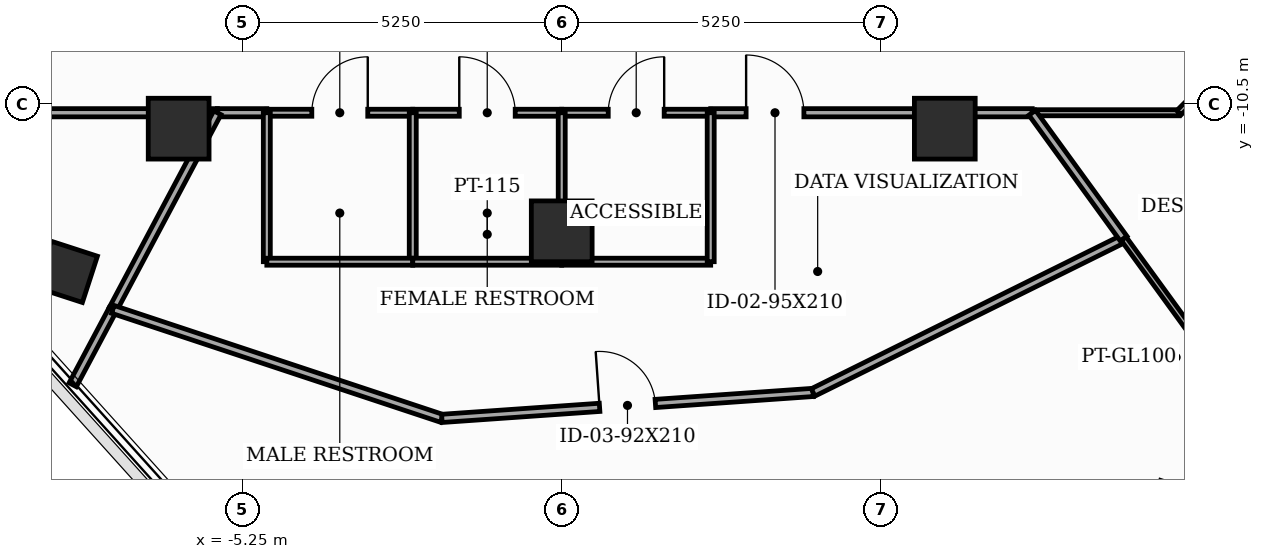
"""IFC4 building model, lengths in metres.
Left out: names, types, materials, properties, quantities, classifications, styles, units other than length and angle.
Written with IfcOpenShell. Run it as: python <this file> out.ifc"""

import sys

from ifc_helpers import new_model, si_unit, direction, frame, frame_2d, origin, origin_2d, place, context, subcontext, project, spatial, rectangle, extrude, element, fill, save


model = new_model("IFC4")
c1 = context("Model", 3, precision=1e-05, world=origin(), true_north=direction((0.0, 1.0)))
c2 = subcontext(c1, "Body", "Model", "MODEL_VIEW")
j1 = project(units=[si_unit("LENGTHUNIT", "METRE"), si_unit("PLANEANGLEUNIT", "RADIAN")], contexts=[c1])
p1 = place(None, origin())
s1 = spatial("IfcSite", under=j1, at=p1, CompositionType="ELEMENT")
p2 = place(p1, origin())
s2 = spatial("IfcBuilding", under=s1, at=p2, CompositionType="ELEMENT")
p3 = place(p2, frame((0.0, 0.0, 298.0)))
s3 = spatial("IfcBuildingStorey", under=s2, at=p3, CompositionType="ELEMENT", Elevation=298.0)
for number, where, z_axis, x_axis in (
    (1, (-6.3, -10.912, 0.0), (0.0, 0.0, 1.0), (1.0, 0.0, 0.0)),
    (2, (0.0, -12.6, 0.0), (0.0, 0.0, 1.0), (1.0, 0.0, 0.0)),
    (3, (6.3, -10.912, 0.0), (0.0, 0.0, 1.0), (1.0, 0.0, 0.0)),
):
    element("IfcColumn", number, at=place(p3, frame(where, z_axis=z_axis, x_axis=x_axis)), inside=s3, PredefinedType="COLUMN", context=c2, shape_type="SweptSolid", body=[
        extrude(rectangle(XDim=1.0, YDim=1.0, at=origin_2d()), origin(), (0.0, 0.0, 1.0), 3.7),
    ])
p4 = place(p3, frame((-8.14, -13.266, 0.0), z_axis=(0.0, 0.0, 1.0), x_axis=(0.309016994375, 0.951056516295, 0.0)))
e4 = element("IfcColumn", 4, at=p4, inside=s3, PredefinedType="COLUMN", context=c2, shape_type="SweptSolid", body=[
    extrude(rectangle(XDim=0.8, YDim=0.8, at=origin_2d()), origin(), (0.0, 0.0, 1.0), 3.7),
])
p5 = place(p3, frame((-10.15, -10.65, 0.0), z_axis=(0.0, 0.0, 1.0), x_axis=(1.0, 0.0, 0.0)))
e5 = element("IfcWall", 5, at=p5, inside=s3, PredefinedType="PARTITIONING", context=c2, shape_type="SweptSolid", body=[
    extrude(rectangle(XDim=4.487, YDim=0.135, at=frame_2d((2.243, 0.0))), origin(), (0.0, 0.0, 1.0), 2.885),
])
p6 = place(p3, frame((-4.85, -10.65, 0.0), z_axis=(0.0, 0.0, 1.0), x_axis=(1.0, 0.0, 0.0)))
e6 = element("IfcWall", 6, at=p6, inside=s3, PredefinedType="PARTITIONING", context=c2, shape_type="SweptSolid", body=[
    extrude(rectangle(XDim=2.4, YDim=0.115, at=frame_2d((1.2, 0.0))), origin(), (0.0, 0.0, 1.0), 3.5),
])
p7 = place(p6, frame((0.74, 0.0, 0.0)))
e7 = element("IfcOpeningElement", 7, at=p7, cuts=e6, PredefinedType="OPENING", context=c2, shape_type="SweptSolid", body=[
    extrude(rectangle(XDim=0.92, YDim=2.1, at=frame_2d((0.46, 1.05))), frame((0.0, 0.067, 0.0), z_axis=(0.0, -1.0, 0.0), x_axis=(1.0, 0.0, 0.0)), (0.0, 0.0, 1.0), 0.135),
])
p8 = place(p3, frame((-2.45, -10.65, 0.0), z_axis=(0.0, 0.0, 1.0), x_axis=(1.0, 0.0, 0.0)))
e8 = element("IfcWall", 8, at=p8, inside=s3, PredefinedType="PARTITIONING", context=c2, shape_type="SweptSolid", body=[
    extrude(rectangle(XDim=2.45, YDim=0.115, at=frame_2d((1.225, 0.0))), origin(), (0.0, 0.0, 1.0), 2.885),
])
p9 = place(p8, frame((0.765, 0.0, 0.0)))
e9 = element("IfcOpeningElement", 9, at=p9, cuts=e8, PredefinedType="OPENING", context=c2, shape_type="SweptSolid", body=[
    extrude(rectangle(XDim=0.92, YDim=2.1, at=frame_2d((0.46, 1.05))), frame((0.0, 0.067, 0.0), z_axis=(0.0, -1.0, 0.0), x_axis=(1.0, 0.0, 0.0)), (0.0, 0.0, 1.0), 0.135),
])
p10 = place(p3, frame((0.0, -10.65, 0.0), z_axis=(0.0, 0.0, 1.0), x_axis=(1.0, 0.0, 0.0)))
e10 = element("IfcWall", 10, at=p10, inside=s3, PredefinedType="PARTITIONING", context=c2, shape_type="SweptSolid", body=[
    extrude(rectangle(XDim=2.45, YDim=0.115, at=frame_2d((1.225, 0.0))), origin(), (0.0, 0.0, 1.0), 3.5),
])
p11 = place(p10, frame((0.765, 0.0, 0.0)))
e11 = element("IfcOpeningElement", 11, at=p11, cuts=e10, PredefinedType="OPENING", context=c2, shape_type="SweptSolid", body=[
    extrude(rectangle(XDim=0.92, YDim=2.1, at=frame_2d((0.46, 1.05))), frame((0.0, 0.067, 0.0), z_axis=(0.0, -1.0, 0.0), x_axis=(1.0, 0.0, 0.0)), (0.0, 0.0, 1.0), 0.135),
])
p12 = place(p3, frame((-5.663, -10.65, 0.0), z_axis=(0.0, 0.0, 1.0), x_axis=(1.0, 0.0, 0.0)))
e12 = element("IfcWall", 12, at=p12, inside=s3, PredefinedType="PARTITIONING", context=c2, shape_type="SweptSolid", body=[
    extrude(rectangle(XDim=0.813, YDim=0.135, at=frame_2d((0.406, 0.0))), origin(), (0.0, 0.0, 1.0), 3.5),
])
p13 = place(p3, frame((2.45, -10.65, 0.0), z_axis=(0.0, 0.0, 1.0), x_axis=(1.0, 0.0, 0.0)))
e13 = element("IfcWall", 13, at=p13, inside=s3, PredefinedType="PARTITIONING", context=c2, shape_type="SweptSolid", body=[
    extrude(rectangle(XDim=5.288, YDim=0.135, at=frame_2d((2.644, 0.0))), origin(), (0.0, 0.0, 1.0), 2.885),
])
p14 = place(p13, frame((0.583, 0.0, 0.0)))
e14 = element("IfcOpeningElement", 14, at=p14, cuts=e13, PredefinedType="OPENING", context=c2, shape_type="SweptSolid", body=[
    extrude(rectangle(XDim=0.95, YDim=2.1, at=frame_2d((0.475, 1.05))), frame((0.0, 0.077, 0.0), z_axis=(0.0, -1.0, 0.0), x_axis=(1.0, 0.0, 0.0)), (0.0, 0.0, 1.0), 0.155),
])
p15 = place(p3, frame((7.738, -10.65, 0.0), z_axis=(0.0, 0.0, 1.0), x_axis=(1.0, 0.0, 0.0)))
e15 = element("IfcWall", 15, at=p15, inside=s3, PredefinedType="MOVABLE", context=c2, shape_type="SweptSolid", body=[
    extrude(rectangle(XDim=2.412, YDim=0.1, at=frame_2d((1.206, 0.0))), origin(), (0.0, 0.0, 1.0), 3.5),
])
p16 = place(p3, frame((10.15, -10.65, 0.0), z_axis=(0.0, 0.0, 1.0), x_axis=(0.707106781187, 0.707106781187, 0.0)))
e16 = element("IfcWall", 16, at=p16, inside=s3, PredefinedType="MOVABLE", context=c2, shape_type="SweptSolid", body=[
    extrude(rectangle(XDim=0.707, YDim=0.1, at=frame_2d((0.354, 0.0))), origin(), (0.0, 0.0, 1.0), 3.5),
])
p17 = place(p3, frame((-7.382, -13.884, 0.0), z_axis=(0.0, 0.0, 1.0), x_axis=(0.469338791783, 0.88301817565, 0.0)))
e17 = element("IfcWall", 17, at=p17, inside=s3, PredefinedType="PARTITIONING", context=c2, shape_type="SweptSolid", body=[
    extrude(rectangle(XDim=3.663, YDim=0.135, at=frame_2d((1.831, 0.0))), origin(), (0.0, 0.0, 1.0), 2.885),
])
p18 = place(p3, frame((-8.042, -15.124, 0.0), z_axis=(0.0, 0.0, 1.0), x_axis=(0.469595679185, 0.882881587808, 0.0)))
e18 = element("IfcWall", 18, at=p18, inside=s3, PredefinedType="PARTITIONING", context=c2, shape_type="SweptSolid", body=[
    extrude(rectangle(XDim=1.405, YDim=0.135, at=frame_2d((0.702, 0.0))), origin(), (0.0, 0.0, 1.0), 3.035),
])
for number, where, z_axis, x_axis in (
    (19, (-2.45, -13.1, 0.0), (0.0, 0.0, 1.0), (0.0, 1.0, 0.0)),
    (20, (-4.85, -10.65, 0.0), (0.0, 0.0, 1.0), (0.0, -1.0, 0.0)),
):
    element("IfcWall", number, at=place(p3, frame(where, z_axis=z_axis, x_axis=x_axis)), inside=s3, PredefinedType="PARTITIONING", context=c2, shape_type="SweptSolid", body=[
        extrude(rectangle(XDim=2.45, YDim=0.115, at=frame_2d((1.225, 0.0))), origin(), (0.0, 0.0, 1.0), 2.885),
    ])
p19 = place(p3, frame((-4.85, -13.1, 0.0), z_axis=(0.0, 0.0, 1.0), x_axis=(1.0, 0.0, 0.0)))
e21 = element("IfcWall", 21, at=p19, inside=s3, PredefinedType="PARTITIONING", context=c2, shape_type="SweptSolid", body=[
    extrude(rectangle(XDim=2.4, YDim=0.115, at=frame_2d((1.2, 0.0))), origin(), (0.0, 0.0, 1.0), 3.5),
])
p20 = place(p3, frame((0.0, -13.1, 0.0), z_axis=(0.0, 0.0, 1.0), x_axis=(0.0, 1.0, 0.0)))
e22 = element("IfcWall", 22, at=p20, inside=s3, PredefinedType="PARTITIONING", context=c2, shape_type="SweptSolid", body=[
    extrude(rectangle(XDim=2.45, YDim=0.115, at=frame_2d((1.225, 0.0))), origin(), (0.0, 0.0, 1.0), 2.885),
])
for number, where, z_axis, x_axis in (
    (23, (-2.45, -13.1, 0.0), (0.0, 0.0, 1.0), (1.0, 0.0, 0.0)),
    (24, (0.0, -13.1, 0.0), (0.0, 0.0, 1.0), (1.0, 0.0, 0.0)),
):
    element("IfcWall", number, at=place(p3, frame(where, z_axis=z_axis, x_axis=x_axis)), inside=s3, PredefinedType="PARTITIONING", context=c2, shape_type="SweptSolid", body=[
        extrude(rectangle(XDim=2.45, YDim=0.115, at=frame_2d((1.225, 0.0))), origin(), (0.0, 0.0, 1.0), 3.035),
    ])
p21 = place(p3, frame((2.45, -13.1, 0.0), z_axis=(0.0, 0.0, 1.0), x_axis=(0.0, 1.0, 0.0)))
e25 = element("IfcWall", 25, at=p21, inside=s3, PredefinedType="PARTITIONING", context=c2, shape_type="SweptSolid", body=[
    extrude(rectangle(XDim=2.45, YDim=0.115, at=frame_2d((1.225, 0.0))), origin(), (0.0, 0.0, 1.0), 2.885),
])
p22 = place(p3, frame((-7.382, -13.884, 0.0), z_axis=(0.0, 0.0, 1.0), x_axis=(0.949247116003, -0.314531258795, 0.0)))
e26 = element("IfcWall", 26, at=p22, inside=s3, PredefinedType="PARTITIONING", context=c2, shape_type="SweptSolid", body=[
    extrude(rectangle(XDim=5.7, YDim=0.135, at=frame_2d((2.85, 0.0))), origin(), (0.0, 0.0, 1.0), 3.035),
])
p23 = place(p3, frame((-1.971, -15.677, 0.0), z_axis=(0.0, 0.0, 1.0), x_axis=(0.997562911572, 0.069772755832, 0.0)))
e27 = element("IfcWall", 27, at=p23, inside=s3, PredefinedType="PARTITIONING", context=c2, shape_type="SweptSolid", body=[
    extrude(rectangle(XDim=6.12, YDim=0.135, at=frame_2d((3.06, 0.0))), origin(), (0.0, 0.0, 1.0), 3.035),
])
p24 = place(p23, frame((2.6, 0.0, 0.0)))
e28 = element("IfcOpeningElement", 28, at=p24, cuts=e27, PredefinedType="OPENING", context=c2, shape_type="SweptSolid", body=[
    extrude(rectangle(XDim=0.92, YDim=2.1, at=frame_2d((0.46, 1.05))), frame((0.0, 0.077, 0.0), z_axis=(0.0, -1.0, 0.0), x_axis=(1.0, 0.0, 0.0)), (0.0, 0.0, 1.0), 0.155),
])
p25 = place(p3, frame((4.134, -15.25, 0.0), z_axis=(0.0, 0.0, 1.0), x_axis=(0.896167979159, 0.443714945804, 0.0)))
e29 = element("IfcWall", 29, at=p25, inside=s3, PredefinedType="PARTITIONING", context=c2, shape_type="SweptSolid", body=[
    extrude(rectangle(XDim=5.7, YDim=0.135, at=frame_2d((2.85, 0.0))), origin(), (0.0, 0.0, 1.0), 3.035),
])
p26 = place(p3, frame((9.242, -12.721, 0.0), z_axis=(0.0, 0.0, 1.0), x_axis=(-0.58758169089, 0.80916485127, 0.0)))
e30 = element("IfcWall", 30, at=p26, inside=s3, PredefinedType="PARTITIONING", context=c2, shape_type="SweptSolid", body=[
    extrude(rectangle(XDim=2.56, YDim=0.135, at=frame_2d((1.28, 0.0))), origin(), (0.0, 0.0, 1.0), 3.5),
])
p27 = place(p3, frame((11.695, -16.096, 0.0), z_axis=(0.0, 0.0, 1.0), x_axis=(-0.587938546927, 0.808905597111, 0.0)))
e31 = element("IfcWall", 31, at=p27, inside=s3, PredefinedType="MOVABLE", context=c2, shape_type="SweptSolid", body=[
    extrude(rectangle(XDim=4.172, YDim=0.1, at=frame_2d((2.086, 0.0))), origin(), (0.0, 0.0, 1.0), 3.035),
])
p28 = place(p7, origin())
e32 = element("IfcDoor", 32, at=p28, inside=s3, OperationType="SINGLE_SWING_RIGHT", PredefinedType="DOOR", context=c2, shape_type="SweptSolid", body=[
    extrude(rectangle(XDim=0.92, YDim=2.1, at=frame_2d((0.46, 1.05))), frame((0.0, 0.025, 0.0), z_axis=(0.0, -1.0, 0.0), x_axis=(1.0, 0.0, 0.0)), (0.0, 0.0, 1.0), 0.05),
])
fill(e7, e32)
p29 = place(p9, origin())
e33 = element("IfcDoor", 33, at=p29, inside=s3, OperationType="SINGLE_SWING_LEFT", PredefinedType="DOOR", context=c2, shape_type="SweptSolid", body=[
    extrude(rectangle(XDim=0.92, YDim=2.1, at=frame_2d((0.46, 1.05))), frame((0.0, 0.025, 0.0), z_axis=(0.0, -1.0, 0.0), x_axis=(1.0, 0.0, 0.0)), (0.0, 0.0, 1.0), 0.05),
])
fill(e9, e33)
p30 = place(p11, origin())
e34 = element("IfcDoor", 34, at=p30, inside=s3, OperationType="SINGLE_SWING_RIGHT", PredefinedType="DOOR", context=c2, shape_type="SweptSolid", body=[
    extrude(rectangle(XDim=0.92, YDim=2.1, at=frame_2d((0.46, 1.05))), frame((0.0, 0.025, 0.0), z_axis=(0.0, -1.0, 0.0), x_axis=(1.0, 0.0, 0.0)), (0.0, 0.0, 1.0), 0.05),
])
fill(e11, e34)
p31 = place(p14, origin())
e35 = element("IfcDoor", 35, at=p31, inside=s3, OperationType="SINGLE_SWING_LEFT", PredefinedType="DOOR", context=c2, shape_type="SweptSolid", body=[
    extrude(rectangle(XDim=0.95, YDim=2.1, at=frame_2d((0.475, 1.05))), frame((0.0, 0.025, 0.0), z_axis=(0.0, -1.0, 0.0), x_axis=(1.0, 0.0, 0.0)), (0.0, 0.0, 1.0), 0.05),
])
fill(e14, e35)
p32 = place(p24, origin())
e36 = element("IfcDoor", 36, at=p32, inside=s3, OperationType="SINGLE_SWING_LEFT", PredefinedType="DOOR", context=c2, shape_type="SweptSolid", body=[
    extrude(rectangle(XDim=0.92, YDim=2.1, at=frame_2d((0.46, 1.05))), frame((0.0, 0.025, 0.0), z_axis=(0.0, -1.0, 0.0), x_axis=(1.0, 0.0, 0.0)), (0.0, 0.0, 1.0), 0.05),
])
fill(e28, e36)
save(model, sys.argv[1])
